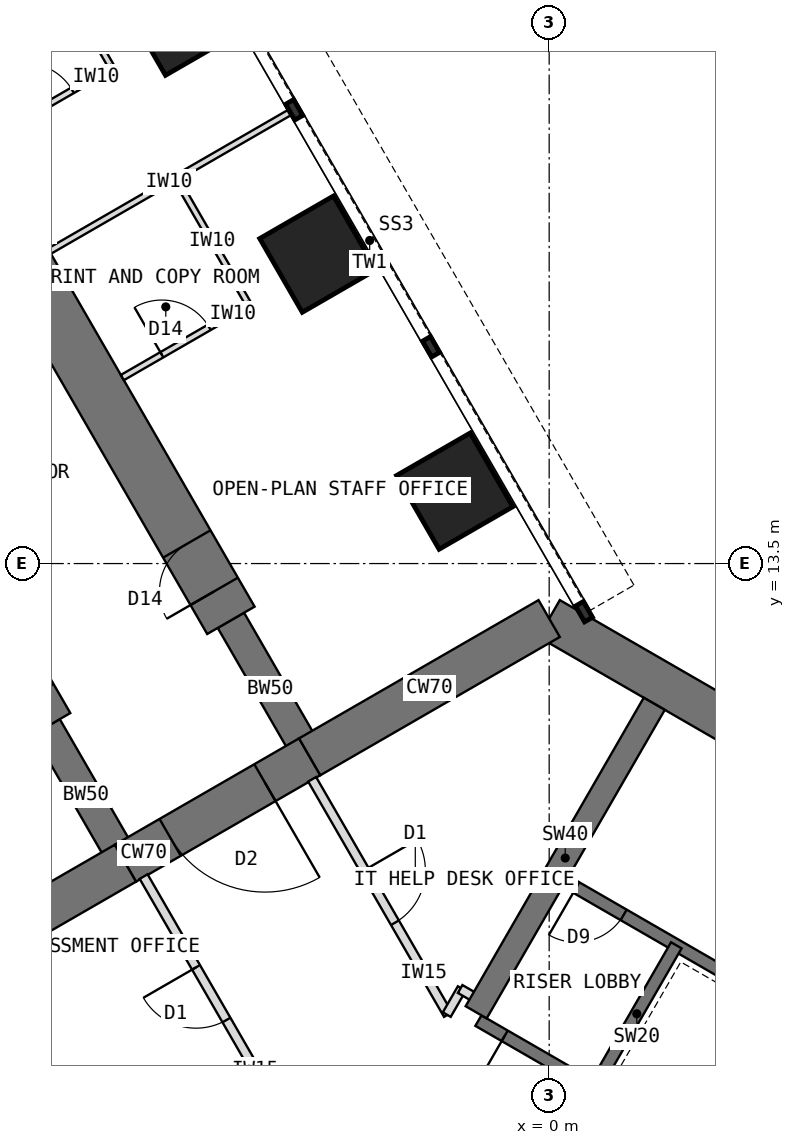
"""IFC4 building model, lengths in metres.
Left out: names, types, materials, properties, quantities, classifications, styles, units other than length and angle.
Written with IfcOpenShell. Run it as: python <this file> out.ifc"""

import sys

from ifc_helpers import new_model, si_unit, direction, frame, frame_2d, origin, origin_2d, place, context, subcontext, project, spatial, rectangle, extrude, element, fill, save


model = new_model("IFC4")
c1 = context("Model", 3, precision=1e-05, world=origin(), true_north=direction((0.0, 1.0)))
c2 = subcontext(c1, "Body", "Model", "MODEL_VIEW")
j1 = project(units=[si_unit("LENGTHUNIT", "METRE"), si_unit("PLANEANGLEUNIT", "RADIAN")], contexts=[c1])
p1 = place(None, origin())
s1 = spatial("IfcSite", under=j1, at=p1, CompositionType="ELEMENT")
p2 = place(p1, origin())
s2 = spatial("IfcBuilding", under=s1, at=p2, CompositionType="ELEMENT")
p3 = place(p2, frame((0.0, 0.0, 76.5)))
s3 = spatial("IfcBuildingStorey", under=s2, at=p3, CompositionType="ELEMENT", Elevation=76.5)
p4 = place(p3, frame((10.908, 6.298, 0.0), z_axis=(0.0, 0.0, 1.0), x_axis=(-0.866021940709, 0.500005998175, 0.0)))
e1 = element("IfcWall", 1, at=p4, inside=s3, PredefinedType="SHEAR", context=c2, shape_type="SweptSolid", body=[
    extrude(rectangle(XDim=12.596, YDim=0.7, at=frame_2d((6.298, 0.0))), origin(), (0.0, 0.0, 1.0), 4.0),
])
p5 = place(p3, frame((0.0, 12.596, 0.0), z_axis=(0.0, 0.0, 1.0), x_axis=(-0.866011268655, -0.500024481964, 0.0)))
e2 = element("IfcWall", 2, at=p5, inside=s3, PredefinedType="SHEAR", context=c2, shape_type="SweptSolid", body=[
    extrude(rectangle(XDim=4.548, YDim=0.7, at=frame_2d((2.274, 0.0))), origin(), (0.0, 0.0, 1.0), 4.0),
])
p6 = place(p3, frame((-3.939, 10.322, 0.0), z_axis=(0.0, 0.0, 1.0), x_axis=(-0.866019471182, -0.500010275428, 0.0)))
e3 = element("IfcWall", 3, at=p6, inside=s3, PredefinedType="SHEAR", context=c2, shape_type="SweptSolid", body=[
    extrude(rectangle(XDim=3.5, YDim=0.7, at=frame_2d((1.75, 0.0))), origin(), (0.0, 0.0, 1.0), 4.0),
])
p7 = place(p6, frame((0.85, 0.0, 0.0)))
e4 = element("IfcOpeningElement", 4, at=p7, cuts=e3, PredefinedType="OPENING", context=c2, shape_type="SweptSolid", body=[
    extrude(rectangle(XDim=1.8, YDim=2.1, at=frame_2d((0.9, 1.05))), frame((0.0, 0.36, 0.0), z_axis=(0.0, -1.0, 0.0), x_axis=(1.0, 0.0, 0.0)), (0.0, 0.0, 1.0), 0.72),
])
p8 = place(p3, frame((-6.97, 8.572, 0.0), z_axis=(0.0, 0.0, 1.0), x_axis=(-0.866034513004, -0.499984222037, 0.0)))
e5 = element("IfcWall", 5, at=p8, inside=s3, PredefinedType="SHEAR", context=c2, shape_type="SweptSolid", body=[
    extrude(rectangle(XDim=4.548, YDim=0.7, at=frame_2d((2.274, 0.0))), origin(), (0.0, 0.0, 1.0), 4.0),
])
p9 = place(p3, frame((-6.97, 8.572, 0.0), z_axis=(0.0, 0.0, 1.0), x_axis=(-0.499988811324, 0.866031863473, 0.0)))
e6 = element("IfcWall", 6, at=p9, inside=s3, PredefinedType="SHEAR", context=c2, shape_type="SweptSolid", body=[
    extrude(rectangle(XDim=2.592, YDim=0.5, at=frame_2d((1.296, 0.0))), origin(), (0.0, 0.0, 1.0), 4.0),
])
p10 = place(p3, frame((-8.266, 10.816, 0.0), z_axis=(0.0, 0.0, 1.0), x_axis=(-0.499996231654, 0.866027579429, 0.0)))
e7 = element("IfcWall", 7, at=p10, inside=s3, PredefinedType="SHEAR", context=c2, shape_type="SweptSolid", body=[
    extrude(rectangle(XDim=13.2, YDim=0.9, at=frame_2d((6.6, 0.0))), origin(), (0.0, 0.0, 1.0), 4.0),
])
p11 = place(p10, frame((0.55, 0.0, 0.0)))
e8 = element("IfcOpeningElement", 8, at=p11, cuts=e7, PredefinedType="OPENING", context=c2, shape_type="SweptSolid", body=[
    extrude(rectangle(XDim=0.9, YDim=2.1, at=frame_2d((0.45, 1.05))), frame((0.0, 0.46, 0.0), z_axis=(0.0, -1.0, 0.0), x_axis=(1.0, 0.0, 0.0)), (0.0, 0.0, 1.0), 0.92),
])
p12 = place(p10, frame((7.3, 0.0, 0.0)))
e9 = element("IfcOpeningElement", 9, at=p12, cuts=e7, PredefinedType="OPENING", context=c2, shape_type="SweptSolid", body=[
    extrude(rectangle(XDim=0.9, YDim=2.1, at=frame_2d((0.45, 1.05))), frame((0.0, 0.46, 0.0), z_axis=(0.0, -1.0, 0.0), x_axis=(1.0, 0.0, 0.0)), (0.0, 0.0, 1.0), 0.92),
])
p13 = place(p3, frame((-3.939, 10.322, 0.0), z_axis=(0.0, 0.0, 1.0), x_axis=(-0.499918158782, 0.866072649678, 0.0)))
e10 = element("IfcWall", 10, at=p13, inside=s3, PredefinedType="SHEAR", context=c2, shape_type="SweptSolid", body=[
    extrude(rectangle(XDim=2.592, YDim=0.5, at=frame_2d((1.296, 0.0))), origin(), (0.0, 0.0, 1.0), 4.0),
])
p14 = place(p3, frame((-5.234, 12.566, 0.0), z_axis=(0.0, 0.0, 1.0), x_axis=(-0.500010103361, 0.866019570528, 0.0)))
e11 = element("IfcWall", 11, at=p14, inside=s3, PredefinedType="SHEAR", context=c2, shape_type="SweptSolid", body=[
    extrude(rectangle(XDim=13.2, YDim=0.9, at=frame_2d((6.6, 0.0))), origin(), (0.0, 0.0, 1.0), 4.0),
])
p15 = place(p14, frame((0.55, 0.0, 0.0)))
e12 = element("IfcOpeningElement", 12, at=p15, cuts=e11, PredefinedType="OPENING", context=c2, shape_type="SweptSolid", body=[
    extrude(rectangle(XDim=0.9, YDim=2.1, at=frame_2d((0.45, 1.05))), frame((0.0, 0.46, 0.0), z_axis=(0.0, -1.0, 0.0), x_axis=(1.0, 0.0, 0.0)), (0.0, 0.0, 1.0), 0.92),
])
p16 = place(p14, frame((7.3, 0.0, 0.0)))
e13 = element("IfcOpeningElement", 13, at=p16, cuts=e11, PredefinedType="OPENING", context=c2, shape_type="SweptSolid", body=[
    extrude(rectangle(XDim=0.9, YDim=2.1, at=frame_2d((0.45, 1.05))), frame((0.0, 0.46, 0.0), z_axis=(0.0, -1.0, 0.0), x_axis=(1.0, 0.0, 0.0)), (0.0, 0.0, 1.0), 0.92),
])
for number, where, z_axis, x_axis in (
    (14, (-1.554, 14.691, 0.0), (0.0, 0.0, 1.0), (0.866, 0.5, 0.0)),
    (15, (-3.804, 18.588, 0.0), (0.0, 0.0, 1.0), (0.866, 0.5, 0.0)),
    (16, (-6.054, 22.486, 0.0), (0.0, 0.0, 1.0), (0.866, 0.5, 0.0)),
):
    element("IfcColumn", number, at=place(p3, frame(where, z_axis=z_axis, x_axis=x_axis)), inside=s3, PredefinedType="COLUMN", context=c2, shape_type="SweptSolid", body=[
        extrude(rectangle(XDim=1.4, YDim=1.4, at=origin_2d()), origin(), (0.0, 0.0, 1.0), 4.0),
    ])
p17 = place(p3, frame((5.764, 1.984, 0.0), z_axis=(0.0, 0.0, 1.0), x_axis=(-0.866026010844, 0.49999894854, 0.0)))
e17 = element("IfcWall", 17, at=p17, inside=s3, PredefinedType="SHEAR", context=c2, shape_type="SweptSolid", body=[
    extrude(rectangle(XDim=8.0, YDim=0.2, at=frame_2d((4.0, 0.0))), origin(), (0.0, 0.0, 1.0), 4.0),
])
p18 = place(p17, frame((6.3, 0.0, 0.0)))
e18 = element("IfcOpeningElement", 18, at=p18, cuts=e17, PredefinedType="OPENING", context=c2, shape_type="SweptSolid", body=[
    extrude(rectangle(XDim=1.2, YDim=2.1, at=frame_2d((0.6, 1.05))), frame((0.0, 0.11, 0.0), z_axis=(0.0, -1.0, 0.0), x_axis=(1.0, 0.0, 0.0)), (0.0, 0.0, 1.0), 0.22),
])
p19 = place(p3, frame((0.791, 4.97, 0.0), z_axis=(0.0, 0.0, 1.0), x_axis=(0.499936506574, 0.866062058628, 0.0)))
e19 = element("IfcWall", 19, at=p19, inside=s3, PredefinedType="SHEAR", context=c2, shape_type="SweptSolid", body=[
    extrude(rectangle(XDim=2.6, YDim=0.2, at=frame_2d((1.3, 0.0))), origin(), (0.0, 0.0, 1.0), 4.0),
])
p20 = place(p3, frame((7.114, 4.322, 0.0), z_axis=(0.0, 0.0, 1.0), x_axis=(-0.866026010844, 0.49999894854, 0.0)))
e20 = element("IfcWall", 20, at=p20, inside=s3, PredefinedType="SHEAR", context=c2, shape_type="SweptSolid", body=[
    extrude(rectangle(XDim=8.0, YDim=0.2, at=frame_2d((4.0, 0.0))), origin(), (0.0, 0.0, 1.0), 4.0),
])
p21 = place(p20, frame((6.8, 0.0, 0.0)))
e21 = element("IfcOpeningElement", 21, at=p21, cuts=e20, PredefinedType="OPENING", context=c2, shape_type="SweptSolid", body=[
    extrude(rectangle(XDim=0.9, YDim=2.1, at=frame_2d((0.45, 1.05))), frame((0.0, 0.11, 0.0), z_axis=(0.0, -1.0, 0.0), x_axis=(1.0, 0.0, 0.0)), (0.0, 0.0, 1.0), 0.22),
])
p22 = place(p3, frame((-1.201, 6.12, 0.0), z_axis=(0.0, 0.0, 1.0), x_axis=(0.500002627198, 0.866023886965, 0.0)))
e22 = element("IfcWall", 22, at=p22, inside=s3, PredefinedType="SHEAR", context=c2, shape_type="SweptSolid", body=[
    extrude(rectangle(XDim=5.858, YDim=0.4, at=frame_2d((2.929, 0.0))), origin(), (0.0, 0.0, 1.0), 4.0),
])
p23 = place(p3, frame((-8.22, 18.637, 0.0), z_axis=(0.0, 0.0, 1.0), x_axis=(0.866012237902, 0.500022803284, 0.0)))
e23 = element("IfcWall", 23, at=p23, inside=s3, PredefinedType="PARTITIONING", context=c2, shape_type="SweptSolid", body=[
    extrude(rectangle(XDim=4.55, YDim=0.1, at=frame_2d((2.275, 0.0))), origin(), (0.0, 0.0, 1.0), 3.8),
])
p24 = place(p3, frame((-4.941, 17.759, 0.0), z_axis=(0.0, 0.0, 1.0), x_axis=(-0.500077600433, 0.865980596518, 0.0)))
e24 = element("IfcWall", 24, at=p24, inside=s3, PredefinedType="PARTITIONING", context=c2, shape_type="SweptSolid", body=[
    extrude(rectangle(XDim=2.4, YDim=0.1, at=frame_2d((1.2, 0.0))), origin(), (0.0, 0.0, 1.0), 3.8),
])
p25 = place(p3, frame((-7.02, 16.559, 0.0), z_axis=(0.0, 0.0, 1.0), x_axis=(0.866050077142, 0.499957262057, 0.0)))
e25 = element("IfcWall", 25, at=p25, inside=s3, PredefinedType="PARTITIONING", context=c2, shape_type="SweptSolid", body=[
    extrude(rectangle(XDim=2.4, YDim=0.1, at=frame_2d((1.2, 0.0))), origin(), (0.0, 0.0, 1.0), 3.8),
])
p26 = place(p25, frame((0.75, 0.0, 0.0)))
e26 = element("IfcOpeningElement", 26, at=p26, cuts=e25, PredefinedType="OPENING", context=c2, shape_type="SweptSolid", body=[
    extrude(rectangle(XDim=0.9, YDim=2.1, at=frame_2d((0.45, 1.05))), frame((0.0, 0.06, 0.0), z_axis=(0.0, -1.0, 0.0), x_axis=(1.0, 0.0, 0.0)), (0.0, 0.0, 1.0), 0.12),
])
p27 = place(p3, frame((-7.191, 21.656, 0.0), z_axis=(0.0, 0.0, 1.0), x_axis=(-0.500077600433, 0.865980596518, 0.0)))
e27 = element("IfcWall", 27, at=p27, inside=s3, PredefinedType="PARTITIONING", context=c2, shape_type="SweptSolid", body=[
    extrude(rectangle(XDim=2.4, YDim=0.1, at=frame_2d((1.2, 0.0))), origin(), (0.0, 0.0, 1.0), 3.8),
])
p28 = place(p3, frame((-9.27, 20.456, 0.0), z_axis=(0.0, 0.0, 1.0), x_axis=(0.866006032174, 0.500033551112, 0.0)))
e28 = element("IfcWall", 28, at=p28, inside=s3, PredefinedType="PARTITIONING", context=c2, shape_type="SweptSolid", body=[
    extrude(rectangle(XDim=2.4, YDim=0.1, at=frame_2d((1.2, 0.0))), origin(), (0.0, 0.0, 1.0), 3.8),
])
p29 = place(p28, frame((0.75, 0.0, 0.0)))
e29 = element("IfcOpeningElement", 29, at=p29, cuts=e28, PredefinedType="OPENING", context=c2, shape_type="SweptSolid", body=[
    extrude(rectangle(XDim=0.9, YDim=2.1, at=frame_2d((0.45, 1.05))), frame((0.0, 0.06, 0.0), z_axis=(0.0, -1.0, 0.0), x_axis=(1.0, 0.0, 0.0)), (0.0, 0.0, 1.0), 0.12),
])
p30 = place(p3, frame((-4.436, 4.483, 0.0), z_axis=(0.0, 0.0, 1.0), x_axis=(-0.500017246033, 0.866015446554, 0.0)))
e30 = element("IfcWall", 30, at=p30, inside=s3, PredefinedType="PARTITIONING", context=c2, shape_type="SweptSolid", body=[
    extrude(rectangle(XDim=4.469, YDim=0.15, at=frame_2d((2.234, 0.0))), origin(), (0.0, 0.0, 1.0), 3.8),
])
p31 = place(p30, frame((1.744, 0.0, 0.0)))
e31 = element("IfcOpeningElement", 31, at=p31, cuts=e30, PredefinedType="OPENING", context=c2, shape_type="SweptSolid", body=[
    extrude(rectangle(XDim=1.0, YDim=2.1, at=frame_2d((0.5, 1.05))), frame((0.0, 0.085, 0.0), z_axis=(0.0, -1.0, 0.0), x_axis=(1.0, 0.0, 0.0)), (0.0, 0.0, 1.0), 0.17),
])
p32 = place(p3, frame((-3.898, 9.952, 0.0), z_axis=(0.0, 0.0, 1.0), x_axis=(0.499999927604, -0.866025445582, 0.0)))
e32 = element("IfcWall", 32, at=p32, inside=s3, PredefinedType="PARTITIONING", context=c2, shape_type="SweptSolid", body=[
    extrude(rectangle(XDim=4.468, YDim=0.15, at=frame_2d((2.234, 0.0))), origin(), (0.0, 0.0, 1.0), 3.8),
])
p33 = place(p32, frame((1.724, 0.0, 0.0)))
e33 = element("IfcOpeningElement", 33, at=p33, cuts=e32, PredefinedType="OPENING", context=c2, shape_type="SweptSolid", body=[
    extrude(rectangle(XDim=1.0, YDim=2.1, at=frame_2d((0.5, 1.05))), frame((0.0, 0.085, 0.0), z_axis=(0.0, -1.0, 0.0), x_axis=(1.0, 0.0, 0.0)), (0.0, 0.0, 1.0), 0.17),
])
p34 = place(p3, frame((-1.684, 6.083, 0.0), z_axis=(0.0, 0.0, 1.0), x_axis=(0.50033519877, 0.865831790172, 0.0)))
e34 = element("IfcWall", 34, at=p34, inside=s3, PredefinedType="PARTITIONING", context=c2, shape_type="SweptSolid", body=[
    extrude(rectangle(XDim=0.494, YDim=0.15, at=frame_2d((0.247, 0.0))), origin(), (0.0, 0.0, 1.0), 3.8),
])
p35 = place(p3, frame((-1.464, 6.503, 0.0), z_axis=(0.0, 0.0, 1.0), x_axis=(0.866138304741, -0.499804398801, 0.0)))
e35 = element("IfcWall", 35, at=p35, inside=s3, PredefinedType="PARTITIONING", context=c2, shape_type="SweptSolid", body=[
    extrude(rectangle(XDim=0.43, YDim=0.15, at=frame_2d((0.215, 0.0))), origin(), (0.0, 0.0, 1.0), 3.8),
])
p36 = place(p18, origin())
e36 = element("IfcDoor", 36, at=p36, inside=s3, OperationType="SINGLE_SWING_RIGHT", PredefinedType="DOOR", context=c2, shape_type="SweptSolid", body=[
    extrude(rectangle(XDim=1.2, YDim=2.1, at=frame_2d((0.6, 1.05))), frame((0.0, 0.025, 0.0), z_axis=(0.0, -1.0, 0.0), x_axis=(1.0, 0.0, 0.0)), (0.0, 0.0, 1.0), 0.05),
])
fill(e18, e36)
p37 = place(p21, origin())
e37 = element("IfcDoor", 37, at=p37, inside=s3, OperationType="SINGLE_SWING_RIGHT", PredefinedType="DOOR", context=c2, shape_type="SweptSolid", body=[
    extrude(rectangle(XDim=0.9, YDim=2.1, at=frame_2d((0.45, 1.05))), frame((0.0, 0.025, 0.0), z_axis=(0.0, -1.0, 0.0), x_axis=(1.0, 0.0, 0.0)), (0.0, 0.0, 1.0), 0.05),
])
fill(e21, e37)
p38 = place(p7, origin())
e38 = element("IfcDoor", 38, at=p38, inside=s3, OperationType="DOUBLE_DOOR_DOUBLE_SWING", PredefinedType="DOOR", context=c2, shape_type="SweptSolid", body=[
    extrude(rectangle(XDim=1.72, YDim=2.06, at=frame_2d((0.9, 1.03))), frame((0.0, 0.025, 0.0), z_axis=(0.0, -1.0, 0.0), x_axis=(1.0, 0.0, 0.0)), (0.0, 0.0, 1.0), 0.05),
    extrude(rectangle(XDim=0.04, YDim=2.1, at=frame_2d((0.02, 1.05))), frame((0.0, 0.35, 0.0), z_axis=(0.0, -1.0, 0.0), x_axis=(1.0, 0.0, 0.0)), (0.0, 0.0, 1.0), 0.699),
    extrude(rectangle(XDim=0.04, YDim=2.1, at=frame_2d((1.78, 1.05))), frame((0.0, 0.35, 0.0), z_axis=(0.0, -1.0, 0.0), x_axis=(1.0, 0.0, 0.0)), (0.0, 0.0, 1.0), 0.699),
    extrude(rectangle(XDim=1.72, YDim=0.04, at=frame_2d((0.9, 2.08))), frame((0.0, 0.35, 0.0), z_axis=(0.0, -1.0, 0.0), x_axis=(1.0, 0.0, 0.0)), (0.0, 0.0, 1.0), 0.699),
])
fill(e4, e38)
p39 = place(p26, origin())
e39 = element("IfcDoor", 39, at=p39, inside=s3, OperationType="SINGLE_SWING_LEFT", PredefinedType="DOOR", context=c2, shape_type="SweptSolid", body=[
    extrude(rectangle(XDim=0.9, YDim=2.1, at=frame_2d((0.45, 1.05))), frame((0.0, 0.025, 0.0), z_axis=(0.0, -1.0, 0.0), x_axis=(1.0, 0.0, 0.0)), (0.0, 0.0, 1.0), 0.05),
])
fill(e26, e39)
p40 = place(p29, origin())
e40 = element("IfcDoor", 40, at=p40, inside=s3, OperationType="SINGLE_SWING_LEFT", PredefinedType="DOOR", context=c2, shape_type="SweptSolid", body=[
    extrude(rectangle(XDim=0.9, YDim=2.1, at=frame_2d((0.45, 1.05))), frame((0.0, 0.025, 0.0), z_axis=(0.0, -1.0, 0.0), x_axis=(1.0, 0.0, 0.0)), (0.0, 0.0, 1.0), 0.05),
])
fill(e29, e40)
p41 = place(p33, origin())
e41 = element("IfcDoor", 41, at=p41, inside=s3, OperationType="SINGLE_SWING_LEFT", PredefinedType="DOOR", context=c2, shape_type="SweptSolid", body=[
    extrude(rectangle(XDim=1.0, YDim=2.1, at=frame_2d((0.5, 1.05))), frame((0.0, 0.025, 0.0), z_axis=(0.0, -1.0, 0.0), x_axis=(1.0, 0.0, 0.0)), (0.0, 0.0, 1.0), 0.05),
])
fill(e33, e41)
p42 = place(p31, origin())
e42 = element("IfcDoor", 42, at=p42, inside=s3, OperationType="SINGLE_SWING_RIGHT", PredefinedType="DOOR", context=c2, shape_type="SweptSolid", body=[
    extrude(rectangle(XDim=1.0, YDim=2.1, at=frame_2d((0.5, 1.05))), frame((0.0, 0.025, 0.0), z_axis=(0.0, -1.0, 0.0), x_axis=(1.0, 0.0, 0.0)), (0.0, 0.0, 1.0), 0.05),
])
fill(e31, e42)
p43 = place(p11, origin())
e43 = element("IfcDoor", 43, at=p43, inside=s3, OperationType="SINGLE_SWING_LEFT", PredefinedType="DOOR", context=c2, shape_type="SweptSolid", body=[
    extrude(rectangle(XDim=0.82, YDim=2.06, at=frame_2d((0.45, 1.03))), frame((0.0, 0.025, 0.0), z_axis=(0.0, -1.0, 0.0), x_axis=(1.0, 0.0, 0.0)), (0.0, 0.0, 1.0), 0.05),
    extrude(rectangle(XDim=0.04, YDim=2.1, at=frame_2d((0.02, 1.05))), frame((0.0, 0.45, 0.0), z_axis=(0.0, -1.0, 0.0), x_axis=(1.0, 0.0, 0.0)), (0.0, 0.0, 1.0), 0.899),
    extrude(rectangle(XDim=0.04, YDim=2.1, at=frame_2d((0.88, 1.05))), frame((0.0, 0.45, 0.0), z_axis=(0.0, -1.0, 0.0), x_axis=(1.0, 0.0, 0.0)), (0.0, 0.0, 1.0), 0.899),
    extrude(rectangle(XDim=0.82, YDim=0.04, at=frame_2d((0.45, 2.08))), frame((0.0, 0.45, 0.0), z_axis=(0.0, -1.0, 0.0), x_axis=(1.0, 0.0, 0.0)), (0.0, 0.0, 1.0), 0.899),
])
fill(e8, e43)
p44 = place(p15, origin())
e44 = element("IfcDoor", 44, at=p44, inside=s3, OperationType="SINGLE_SWING_LEFT", PredefinedType="DOOR", context=c2, shape_type="SweptSolid", body=[
    extrude(rectangle(XDim=0.82, YDim=2.06, at=frame_2d((0.45, 1.03))), frame((0.0, 0.025, 0.0), z_axis=(0.0, -1.0, 0.0), x_axis=(1.0, 0.0, 0.0)), (0.0, 0.0, 1.0), 0.05),
    extrude(rectangle(XDim=0.04, YDim=2.1, at=frame_2d((0.02, 1.05))), frame((0.0, 0.45, 0.0), z_axis=(0.0, -1.0, 0.0), x_axis=(1.0, 0.0, 0.0)), (0.0, 0.0, 1.0), 0.899),
    extrude(rectangle(XDim=0.04, YDim=2.1, at=frame_2d((0.88, 1.05))), frame((0.0, 0.45, 0.0), z_axis=(0.0, -1.0, 0.0), x_axis=(1.0, 0.0, 0.0)), (0.0, 0.0, 1.0), 0.899),
    extrude(rectangle(XDim=0.82, YDim=0.04, at=frame_2d((0.45, 2.08))), frame((0.0, 0.45, 0.0), z_axis=(0.0, -1.0, 0.0), x_axis=(1.0, 0.0, 0.0)), (0.0, 0.0, 1.0), 0.899),
])
fill(e12, e44)
save(model, sys.argv[1])
